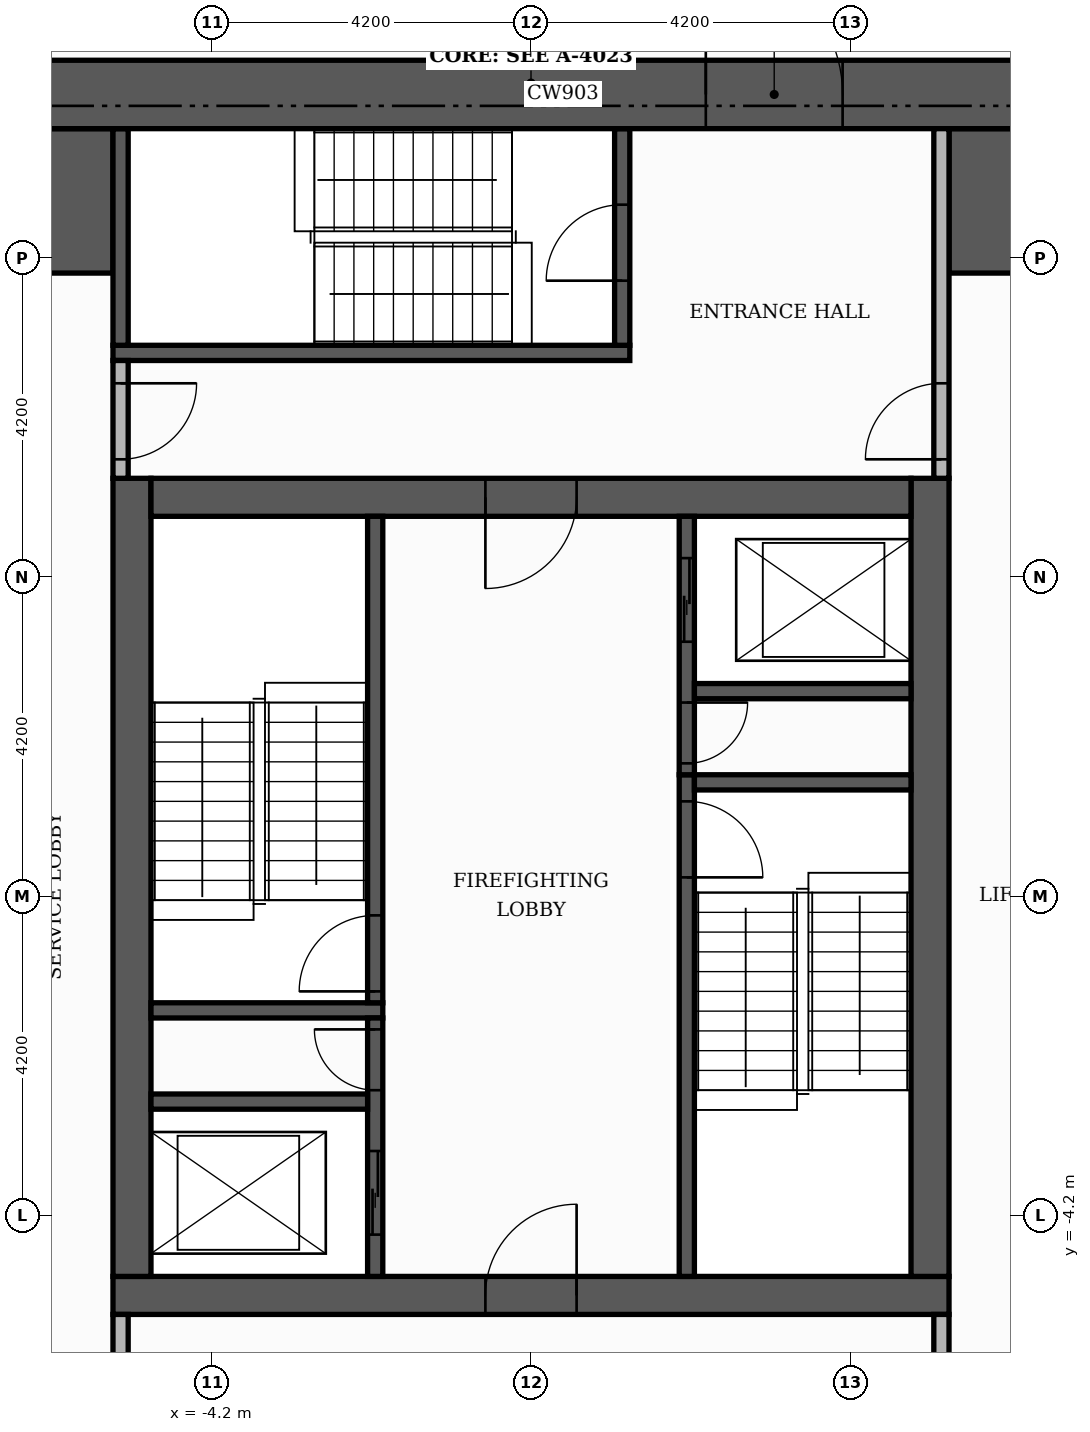
"""IFC4 building model, lengths in metres.
Left out: names, types, materials, properties, quantities, classifications, styles, units other than length and angle.
Written with IfcOpenShell. Run it as: python <this file> out.ifc"""

import sys

from ifc_helpers import new_model, si_unit, direction, frame, frame_2d, origin, place, context, subcontext, project, spatial, rectangle, extrude, element, fill, save


model = new_model("IFC4")
c1 = context("Model", 3, precision=1e-05, world=origin(), true_north=direction((0.0, 1.0)))
c2 = subcontext(c1, "Body", "Model", "MODEL_VIEW")
j1 = project(units=[si_unit("LENGTHUNIT", "METRE"), si_unit("PLANEANGLEUNIT", "RADIAN")], contexts=[c1])
p1 = place(None, origin())
s1 = spatial("IfcSite", under=j1, at=p1, CompositionType="ELEMENT")
p2 = place(p1, origin())
s2 = spatial("IfcBuilding", under=s1, at=p2, CompositionType="ELEMENT")
p3 = place(p2, frame((0.0, 0.0, 141.6)))
s3 = spatial("IfcBuildingStorey", under=s2, at=p3, CompositionType="ELEMENT", Elevation=141.6)
p4 = place(p3, frame((-5.5, -5.25, 0.0), z_axis=(0.0, 0.0, 1.0), x_axis=(1.0, 0.0, 0.0)))
e1 = element("IfcWall", 1, at=p4, inside=s3, PredefinedType="SHEAR", context=c2, shape_type="SweptSolid", body=[
    extrude(rectangle(XDim=11.0, YDim=0.5, at=frame_2d((5.5, 0.0))), origin(), (0.0, 0.0, 1.0), 3.48),
])
p5 = place(p4, frame((4.9, 0.0, 0.0)))
e2 = element("IfcOpeningElement", 2, at=p5, cuts=e1, PredefinedType="OPENING", context=c2, shape_type="SweptSolid", body=[
    extrude(rectangle(XDim=1.2, YDim=2.1, at=frame_2d((0.6, 1.05))), frame((0.0, 0.26, 0.0), z_axis=(0.0, -1.0, 0.0), x_axis=(1.0, 0.0, 0.0)), (0.0, 0.0, 1.0), 0.52),
])
for number, where, z_axis, x_axis in (
    (3, (-5.25, -5.0, 0.0), (0.0, 0.0, 1.0), (0.0, 1.0, 0.0)),
    (4, (5.25, -5.0, 0.0), (0.0, 0.0, 1.0), (0.0, 1.0, 0.0)),
):
    element("IfcWall", number, at=place(p3, frame(where, z_axis=z_axis, x_axis=x_axis)), inside=s3, PredefinedType="SHEAR", context=c2, shape_type="SweptSolid", body=[
        extrude(rectangle(XDim=10.5, YDim=0.5, at=frame_2d((5.25, 0.0))), origin(), (0.0, 0.0, 1.0), 3.48),
    ])
p6 = place(p3, frame((-5.0, 5.25, 0.0), z_axis=(0.0, 0.0, 1.0), x_axis=(1.0, 0.0, 0.0)))
e5 = element("IfcWall", 5, at=p6, inside=s3, PredefinedType="SHEAR", context=c2, shape_type="SweptSolid", body=[
    extrude(rectangle(XDim=10.0, YDim=0.5, at=frame_2d((5.0, 0.0))), origin(), (0.0, 0.0, 1.0), 3.48),
])
p7 = place(p6, frame((4.4, 0.0, 0.0)))
e6 = element("IfcOpeningElement", 6, at=p7, cuts=e5, PredefinedType="OPENING", context=c2, shape_type="SweptSolid", body=[
    extrude(rectangle(XDim=1.2, YDim=2.1, at=frame_2d((0.6, 1.05))), frame((0.0, 0.26, 0.0), z_axis=(0.0, -1.0, 0.0), x_axis=(1.0, 0.0, 0.0)), (0.0, 0.0, 1.0), 0.52),
])
for number, where, z_axis, x_axis in (
    (7, (-10.1, 9.15, 0.0), (0.0, 0.0, 1.0), (1.0, 0.0, 0.0)),
    (8, (5.5, 9.15, 0.0), (0.0, 0.0, 1.0), (1.0, 0.0, 0.0)),
):
    element("IfcWall", number, at=place(p3, frame(where, z_axis=z_axis, x_axis=x_axis)), inside=s3, PredefinedType="SHEAR", context=c2, shape_type="SweptSolid", body=[
        extrude(rectangle(XDim=4.6, YDim=1.9, at=frame_2d((2.3, 0.0))), origin(), (0.0, 0.0, 1.0), 3.48),
    ])
p8 = place(p3, frame((2.05, -5.0, 0.0), z_axis=(0.0, 0.0, 1.0), x_axis=(0.0, 1.0, 0.0)))
e9 = element("IfcWall", 9, at=p8, inside=s3, PredefinedType="SHEAR", context=c2, shape_type="SweptSolid", body=[
    extrude(rectangle(XDim=6.6, YDim=0.2, at=frame_2d((3.3, 0.0))), origin(), (0.0, 0.0, 1.0), 3.48),
])
p9 = place(p8, frame((5.25, 0.0, 0.0)))
e10 = element("IfcOpeningElement", 10, at=p9, cuts=e9, PredefinedType="OPENING", context=c2, shape_type="SweptSolid", body=[
    extrude(rectangle(XDim=1.0, YDim=2.1, at=frame_2d((0.5, 1.05))), frame((0.0, 0.11, 0.0), z_axis=(0.0, -1.0, 0.0), x_axis=(1.0, 0.0, 0.0)), (0.0, 0.0, 1.0), 0.22),
])
p10 = place(p3, frame((-5.0, -1.5, 0.0), z_axis=(0.0, 0.0, 1.0), x_axis=(1.0, 0.0, 0.0)))
e11 = element("IfcWall", 11, at=p10, inside=s3, PredefinedType="SHEAR", context=c2, shape_type="SweptSolid", body=[
    extrude(rectangle(XDim=3.05, YDim=0.2, at=frame_2d((1.525, 0.0))), origin(), (0.0, 0.0, 1.0), 3.48),
])
p11 = place(p3, frame((-2.05, -1.4, 0.0), z_axis=(0.0, 0.0, 1.0), x_axis=(0.0, 1.0, 0.0)))
e12 = element("IfcWall", 12, at=p11, inside=s3, PredefinedType="SHEAR", context=c2, shape_type="SweptSolid", body=[
    extrude(rectangle(XDim=6.4, YDim=0.2, at=frame_2d((3.2, 0.0))), origin(), (0.0, 0.0, 1.0), 3.48),
])
p12 = place(p11, frame((0.15, 0.0, 0.0)))
e13 = element("IfcOpeningElement", 13, at=p12, cuts=e12, PredefinedType="OPENING", context=c2, shape_type="SweptSolid", body=[
    extrude(rectangle(XDim=1.0, YDim=2.1, at=frame_2d((0.5, 1.05))), frame((0.0, 0.11, 0.0), z_axis=(0.0, -1.0, 0.0), x_axis=(1.0, 0.0, 0.0)), (0.0, 0.0, 1.0), 0.22),
])
p13 = place(p3, frame((2.15, 1.5, 0.0), z_axis=(0.0, 0.0, 1.0), x_axis=(1.0, 0.0, 0.0)))
e14 = element("IfcWall", 14, at=p13, inside=s3, PredefinedType="SHEAR", context=c2, shape_type="SweptSolid", body=[
    extrude(rectangle(XDim=2.85, YDim=0.2, at=frame_2d((1.425, 0.0))), origin(), (0.0, 0.0, 1.0), 3.48),
])
p14 = place(p3, frame((-5.5, 7.15, 0.0), z_axis=(0.0, 0.0, 1.0), x_axis=(1.0, 0.0, 0.0)))
e15 = element("IfcWall", 15, at=p14, inside=s3, PredefinedType="SHEAR", context=c2, shape_type="SweptSolid", body=[
    extrude(rectangle(XDim=6.8, YDim=0.2, at=frame_2d((3.4, 0.0))), origin(), (0.0, 0.0, 1.0), 3.48),
])
p15 = place(p3, frame((-5.4, 7.25, 0.0), z_axis=(0.0, 0.0, 1.0), x_axis=(0.0, 1.0, 0.0)))
e16 = element("IfcWall", 16, at=p15, inside=s3, PredefinedType="SHEAR", context=c2, shape_type="SweptSolid", body=[
    extrude(rectangle(XDim=2.85, YDim=0.2, at=frame_2d((1.425, 0.0))), origin(), (0.0, 0.0, 1.0), 3.48),
])
p16 = place(p3, frame((1.2, 7.25, 0.0), z_axis=(0.0, 0.0, 1.0), x_axis=(0.0, 1.0, 0.0)))
e17 = element("IfcWall", 17, at=p16, inside=s3, PredefinedType="SHEAR", context=c2, shape_type="SweptSolid", body=[
    extrude(rectangle(XDim=2.85, YDim=0.2, at=frame_2d((1.425, 0.0))), origin(), (0.0, 0.0, 1.0), 3.48),
])
p17 = place(p16, frame((0.85, 0.0, 0.0)))
e18 = element("IfcOpeningElement", 18, at=p17, cuts=e17, PredefinedType="OPENING", context=c2, shape_type="SweptSolid", body=[
    extrude(rectangle(XDim=1.0, YDim=2.1, at=frame_2d((0.5, 1.05))), frame((0.0, 0.11, 0.0), z_axis=(0.0, -1.0, 0.0), x_axis=(1.0, 0.0, 0.0)), (0.0, 0.0, 1.0), 0.22),
])
p18 = place(p3, frame((-2.05, -5.0, 0.0), z_axis=(0.0, 0.0, 1.0), x_axis=(0.0, 1.0, 0.0)))
e19 = element("IfcWall", 19, at=p18, inside=s3, PredefinedType="SHEAR", context=c2, shape_type="SweptSolid", body=[
    extrude(rectangle(XDim=3.4, YDim=0.2, at=frame_2d((1.7, 0.0))), origin(), (0.0, 0.0, 1.0), 3.48),
])
p19 = place(p18, frame((0.55, 0.0, 0.0)))
e20 = element("IfcOpeningElement", 20, at=p19, cuts=e19, PredefinedType="OPENING", context=c2, shape_type="SweptSolid", body=[
    extrude(rectangle(XDim=1.1, YDim=2.1, at=frame_2d((0.55, 1.05))), frame((0.0, 0.11, 0.0), z_axis=(0.0, -1.0, 0.0), x_axis=(1.0, 0.0, 0.0)), (0.0, 0.0, 1.0), 0.22),
])
p20 = place(p18, frame((2.45, 0.0, 0.0)))
e21 = element("IfcOpeningElement", 21, at=p20, cuts=e19, PredefinedType="OPENING", context=c2, shape_type="SweptSolid", body=[
    extrude(rectangle(XDim=0.8, YDim=2.1, at=frame_2d((0.4, 1.05))), frame((0.0, 0.11, 0.0), z_axis=(0.0, -1.0, 0.0), x_axis=(1.0, 0.0, 0.0)), (0.0, 0.0, 1.0), 0.22),
])
p21 = place(p3, frame((-5.0, -2.7, 0.0), z_axis=(0.0, 0.0, 1.0), x_axis=(1.0, 0.0, 0.0)))
e22 = element("IfcWall", 22, at=p21, inside=s3, PredefinedType="SHEAR", context=c2, shape_type="SweptSolid", body=[
    extrude(rectangle(XDim=2.85, YDim=0.2, at=frame_2d((1.425, 0.0))), origin(), (0.0, 0.0, 1.0), 3.48),
])
p22 = place(p3, frame((2.05, 1.6, 0.0), z_axis=(0.0, 0.0, 1.0), x_axis=(0.0, 1.0, 0.0)))
e23 = element("IfcWall", 23, at=p22, inside=s3, PredefinedType="SHEAR", context=c2, shape_type="SweptSolid", body=[
    extrude(rectangle(XDim=3.4, YDim=0.2, at=frame_2d((1.7, 0.0))), origin(), (0.0, 0.0, 1.0), 3.48),
])
p23 = place(p22, frame((1.75, 0.0, 0.0)))
e24 = element("IfcOpeningElement", 24, at=p23, cuts=e23, PredefinedType="OPENING", context=c2, shape_type="SweptSolid", body=[
    extrude(rectangle(XDim=1.1, YDim=2.1, at=frame_2d((0.55, 1.05))), frame((0.0, 0.11, 0.0), z_axis=(0.0, -1.0, 0.0), x_axis=(1.0, 0.0, 0.0)), (0.0, 0.0, 1.0), 0.22),
])
p24 = place(p22, frame((0.15, 0.0, 0.0)))
e25 = element("IfcOpeningElement", 25, at=p24, cuts=e23, PredefinedType="OPENING", context=c2, shape_type="SweptSolid", body=[
    extrude(rectangle(XDim=0.8, YDim=2.1, at=frame_2d((0.4, 1.05))), frame((0.0, 0.11, 0.0), z_axis=(0.0, -1.0, 0.0), x_axis=(1.0, 0.0, 0.0)), (0.0, 0.0, 1.0), 0.22),
])
p25 = place(p3, frame((2.15, 2.7, 0.0), z_axis=(0.0, 0.0, 1.0), x_axis=(1.0, 0.0, 0.0)))
e26 = element("IfcWall", 26, at=p25, inside=s3, PredefinedType="SHEAR", context=c2, shape_type="SweptSolid", body=[
    extrude(rectangle(XDim=2.85, YDim=0.2, at=frame_2d((1.425, 0.0))), origin(), (0.0, 0.0, 1.0), 3.48),
])
p26 = place(p3, frame((-11.0, 10.55, 0.0), z_axis=(0.0, 0.0, 1.0), x_axis=(1.0, 0.0, 0.0)))
e27 = element("IfcWall", 27, at=p26, inside=s3, PredefinedType="SHEAR", context=c2, shape_type="SweptSolid", body=[
    extrude(rectangle(XDim=22.0, YDim=0.9, at=frame_2d((11.0, 0.0))), origin(), (0.0, 0.0, 1.0), 3.48),
])
p27 = place(p26, frame((13.3, 0.0, 0.0)))
e28 = element("IfcOpeningElement", 28, at=p27, cuts=e27, PredefinedType="OPENING", context=c2, shape_type="SweptSolid", body=[
    extrude(rectangle(XDim=1.8, YDim=2.2, at=frame_2d((0.9, 1.1))), frame((0.0, 0.46, 0.0), z_axis=(0.0, -1.0, 0.0), x_axis=(1.0, 0.0, 0.0)), (0.0, 0.0, 1.0), 0.92),
])
p28 = place(p3, frame((-5.4, -10.1, 0.0), z_axis=(0.0, 0.0, 1.0), x_axis=(0.0, 1.0, 0.0)))
e29 = element("IfcWall", 29, at=p28, inside=s3, PredefinedType="PARTITIONING", context=c2, shape_type="SweptSolid", body=[
    extrude(rectangle(XDim=4.6, YDim=0.2, at=frame_2d((2.3, 0.0))), origin(), (0.0, 0.0, 1.0), 3.48),
])
p29 = place(p28, frame((2.9, 0.0, 0.0)))
e30 = element("IfcOpeningElement", 30, at=p29, cuts=e29, PredefinedType="OPENING", context=c2, shape_type="SweptSolid", body=[
    extrude(rectangle(XDim=1.0, YDim=2.1, at=frame_2d((0.5, 1.05))), frame((0.0, 0.11, 0.0), z_axis=(0.0, -1.0, 0.0), x_axis=(1.0, 0.0, 0.0)), (0.0, 0.0, 1.0), 0.22),
])
p30 = place(p3, frame((5.4, -10.1, 0.0), z_axis=(0.0, 0.0, 1.0), x_axis=(0.0, 1.0, 0.0)))
e31 = element("IfcWall", 31, at=p30, inside=s3, PredefinedType="PARTITIONING", context=c2, shape_type="SweptSolid", body=[
    extrude(rectangle(XDim=4.6, YDim=0.2, at=frame_2d((2.3, 0.0))), origin(), (0.0, 0.0, 1.0), 3.48),
])
p31 = place(p30, frame((2.9, 0.0, 0.0)))
e32 = element("IfcOpeningElement", 32, at=p31, cuts=e31, PredefinedType="OPENING", context=c2, shape_type="SweptSolid", body=[
    extrude(rectangle(XDim=1.0, YDim=2.1, at=frame_2d((0.5, 1.05))), frame((0.0, 0.11, 0.0), z_axis=(0.0, -1.0, 0.0), x_axis=(1.0, 0.0, 0.0)), (0.0, 0.0, 1.0), 0.22),
])
p32 = place(p3, frame((-5.4, 5.5, 0.0), z_axis=(0.0, 0.0, 1.0), x_axis=(0.0, 1.0, 0.0)))
e33 = element("IfcWall", 33, at=p32, inside=s3, PredefinedType="PARTITIONING", context=c2, shape_type="SweptSolid", body=[
    extrude(rectangle(XDim=1.55, YDim=0.2, at=frame_2d((0.775, 0.0))), origin(), (0.0, 0.0, 1.0), 3.48),
])
p33 = place(p32, frame((0.25, 0.0, 0.0)))
e34 = element("IfcOpeningElement", 34, at=p33, cuts=e33, PredefinedType="OPENING", context=c2, shape_type="SweptSolid", body=[
    extrude(rectangle(XDim=1.0, YDim=2.1, at=frame_2d((0.5, 1.05))), frame((0.0, 0.11, 0.0), z_axis=(0.0, -1.0, 0.0), x_axis=(1.0, 0.0, 0.0)), (0.0, 0.0, 1.0), 0.22),
])
p34 = place(p3, frame((5.4, 5.5, 0.0), z_axis=(0.0, 0.0, 1.0), x_axis=(0.0, 1.0, 0.0)))
e35 = element("IfcWall", 35, at=p34, inside=s3, PredefinedType="PARTITIONING", context=c2, shape_type="SweptSolid", body=[
    extrude(rectangle(XDim=4.6, YDim=0.2, at=frame_2d((2.3, 0.0))), origin(), (0.0, 0.0, 1.0), 3.48),
])
p35 = place(p34, frame((0.25, 0.0, 0.0)))
e36 = element("IfcOpeningElement", 36, at=p35, cuts=e35, PredefinedType="OPENING", context=c2, shape_type="SweptSolid", body=[
    extrude(rectangle(XDim=1.0, YDim=2.1, at=frame_2d((0.5, 1.05))), frame((0.0, 0.11, 0.0), z_axis=(0.0, -1.0, 0.0), x_axis=(1.0, 0.0, 0.0)), (0.0, 0.0, 1.0), 0.22),
])
p36 = place(p23, origin())
e37 = element("IfcDoor", 37, at=p36, inside=s3, OperationType="SLIDING_TO_LEFT", PredefinedType="DOOR", context=c2, shape_type="SweptSolid", body=[
    extrude(rectangle(XDim=1.1, YDim=2.1, at=frame_2d((0.55, 1.05))), frame((0.0, 0.025, 0.0), z_axis=(0.0, -1.0, 0.0), x_axis=(1.0, 0.0, 0.0)), (0.0, 0.0, 1.0), 0.05),
])
fill(e24, e37)
p37 = place(p19, origin())
e38 = element("IfcDoor", 38, at=p37, inside=s3, OperationType="SLIDING_TO_LEFT", PredefinedType="DOOR", context=c2, shape_type="SweptSolid", body=[
    extrude(rectangle(XDim=1.1, YDim=2.1, at=frame_2d((0.55, 1.05))), frame((0.0, 0.025, 0.0), z_axis=(0.0, -1.0, 0.0), x_axis=(1.0, 0.0, 0.0)), (0.0, 0.0, 1.0), 0.05),
])
fill(e20, e38)
p38 = place(p12, origin())
e39 = element("IfcDoor", 39, at=p38, inside=s3, OperationType="SINGLE_SWING_LEFT", PredefinedType="DOOR", context=c2, shape_type="SweptSolid", body=[
    extrude(rectangle(XDim=1.0, YDim=2.1, at=frame_2d((0.5, 1.05))), frame((0.0, 0.025, 0.0), z_axis=(0.0, -1.0, 0.0), x_axis=(1.0, 0.0, 0.0)), (0.0, 0.0, 1.0), 0.05),
])
fill(e13, e39)
p39 = place(p9, frame((1.0, 0.0, 0.0), z_axis=(0.0, 0.0, 1.0), x_axis=(-1.0, 0.0, 0.0)))
e40 = element("IfcDoor", 40, at=p39, inside=s3, OperationType="SINGLE_SWING_LEFT", PredefinedType="DOOR", context=c2, shape_type="SweptSolid", body=[
    extrude(rectangle(XDim=1.0, YDim=2.1, at=frame_2d((0.5, 1.05))), frame((0.0, 0.025, 0.0), z_axis=(0.0, -1.0, 0.0), x_axis=(1.0, 0.0, 0.0)), (0.0, 0.0, 1.0), 0.05),
])
fill(e10, e40)
p40 = place(p24, frame((0.8, 0.0, 0.0), z_axis=(0.0, 0.0, 1.0), x_axis=(-1.0, 0.0, 0.0)))
e41 = element("IfcDoor", 41, at=p40, inside=s3, OperationType="SINGLE_SWING_RIGHT", PredefinedType="DOOR", context=c2, shape_type="SweptSolid", body=[
    extrude(rectangle(XDim=0.8, YDim=2.1, at=frame_2d((0.4, 1.05))), frame((0.0, 0.025, 0.0), z_axis=(0.0, -1.0, 0.0), x_axis=(1.0, 0.0, 0.0)), (0.0, 0.0, 1.0), 0.05),
])
fill(e25, e41)
p41 = place(p20, origin())
e42 = element("IfcDoor", 42, at=p41, inside=s3, OperationType="SINGLE_SWING_RIGHT", PredefinedType="DOOR", context=c2, shape_type="SweptSolid", body=[
    extrude(rectangle(XDim=0.8, YDim=2.1, at=frame_2d((0.4, 1.05))), frame((0.0, 0.025, 0.0), z_axis=(0.0, -1.0, 0.0), x_axis=(1.0, 0.0, 0.0)), (0.0, 0.0, 1.0), 0.05),
])
fill(e21, e42)
p42 = place(p7, frame((1.2, 0.0, 0.0), z_axis=(0.0, 0.0, 1.0), x_axis=(-1.0, 0.0, 0.0)))
e43 = element("IfcDoor", 43, at=p42, inside=s3, OperationType="SINGLE_SWING_LEFT", PredefinedType="DOOR", context=c2, shape_type="SweptSolid", body=[
    extrude(rectangle(XDim=1.2, YDim=2.1, at=frame_2d((0.6, 1.05))), frame((0.0, 0.025, 0.0), z_axis=(0.0, -1.0, 0.0), x_axis=(1.0, 0.0, 0.0)), (0.0, 0.0, 1.0), 0.05),
])
fill(e6, e43)
p43 = place(p5, origin())
e44 = element("IfcDoor", 44, at=p43, inside=s3, OperationType="SINGLE_SWING_RIGHT", PredefinedType="DOOR", context=c2, shape_type="SweptSolid", body=[
    extrude(rectangle(XDim=1.2, YDim=2.1, at=frame_2d((0.6, 1.05))), frame((0.0, 0.025, 0.0), z_axis=(0.0, -1.0, 0.0), x_axis=(1.0, 0.0, 0.0)), (0.0, 0.0, 1.0), 0.05),
])
fill(e2, e44)
p44 = place(p17, origin())
e45 = element("IfcDoor", 45, at=p44, inside=s3, OperationType="SINGLE_SWING_LEFT", PredefinedType="DOOR", context=c2, shape_type="SweptSolid", body=[
    extrude(rectangle(XDim=1.0, YDim=2.1, at=frame_2d((0.5, 1.05))), frame((0.0, 0.025, 0.0), z_axis=(0.0, -1.0, 0.0), x_axis=(1.0, 0.0, 0.0)), (0.0, 0.0, 1.0), 0.05),
])
fill(e18, e45)
p45 = place(p33, frame((1.0, 0.0, 0.0), z_axis=(0.0, 0.0, 1.0), x_axis=(-1.0, 0.0, 0.0)))
e46 = element("IfcDoor", 46, at=p45, inside=s3, OperationType="SINGLE_SWING_RIGHT", PredefinedType="DOOR", context=c2, shape_type="SweptSolid", body=[
    extrude(rectangle(XDim=1.0, YDim=2.1, at=frame_2d((0.5, 1.05))), frame((0.0, 0.025, 0.0), z_axis=(0.0, -1.0, 0.0), x_axis=(1.0, 0.0, 0.0)), (0.0, 0.0, 1.0), 0.05),
])
fill(e34, e46)
p46 = place(p35, origin())
e47 = element("IfcDoor", 47, at=p46, inside=s3, OperationType="SINGLE_SWING_LEFT", PredefinedType="DOOR", context=c2, shape_type="SweptSolid", body=[
    extrude(rectangle(XDim=1.0, YDim=2.1, at=frame_2d((0.5, 1.05))), frame((0.0, 0.025, 0.0), z_axis=(0.0, -1.0, 0.0), x_axis=(1.0, 0.0, 0.0)), (0.0, 0.0, 1.0), 0.05),
])
fill(e36, e47)
p47 = place(p27, origin())
e48 = element("IfcDoor", 48, at=p47, inside=s3, OperationType="DOUBLE_DOOR_SINGLE_SWING", PredefinedType="DOOR", context=c2, shape_type="SweptSolid", body=[
    extrude(rectangle(XDim=1.8, YDim=2.2, at=frame_2d((0.9, 1.1))), frame((0.0, 0.025, 0.0), z_axis=(0.0, -1.0, 0.0), x_axis=(1.0, 0.0, 0.0)), (0.0, 0.0, 1.0), 0.05),
])
fill(e28, e48)
save(model, sys.argv[1])
